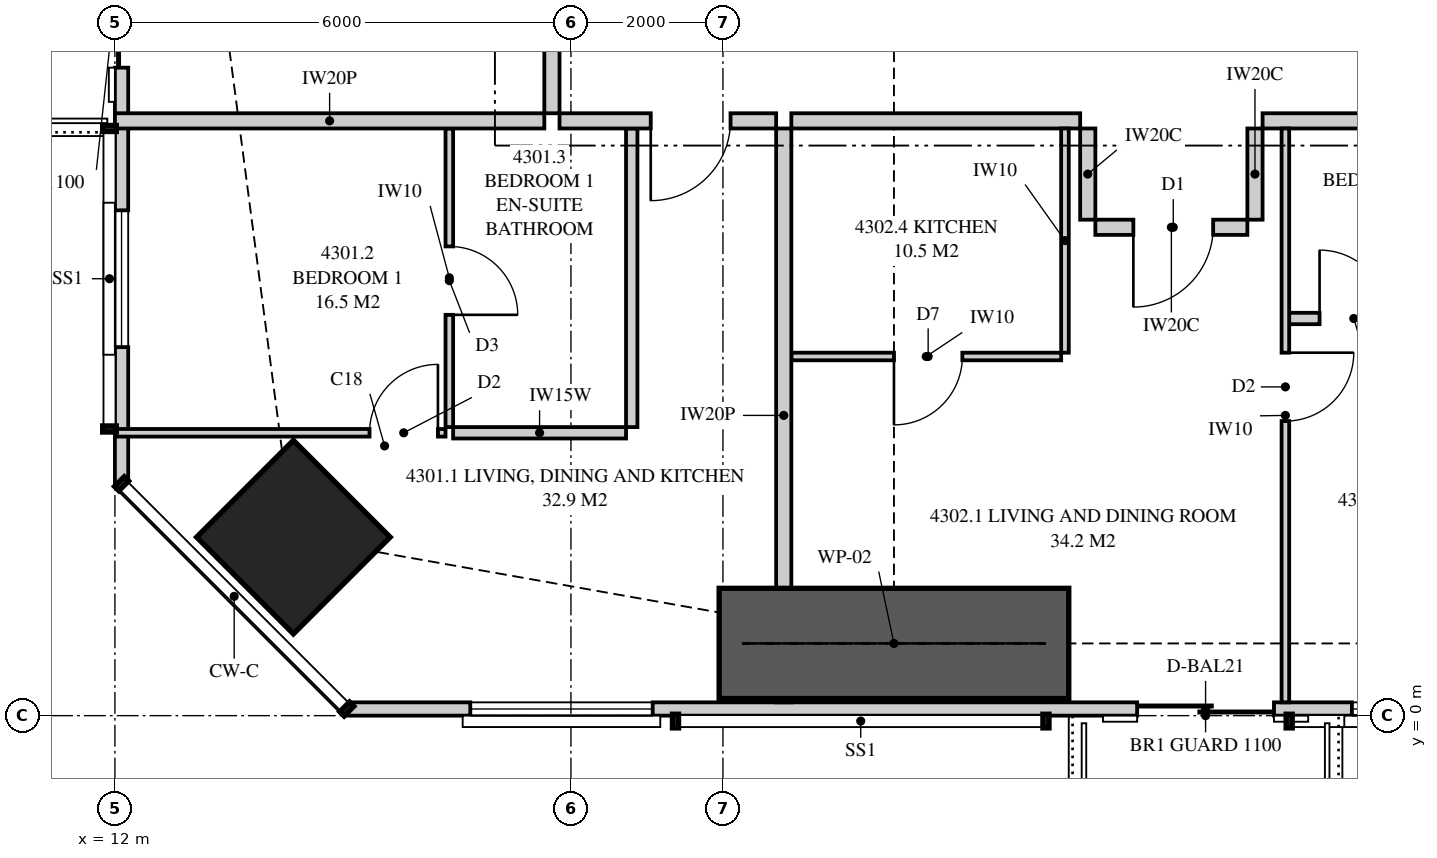
"""IFC4 building model, lengths in metres.
Left out: names, types, materials, properties, quantities, classifications, styles, units other than length and angle.
Written with IfcOpenShell. Run it as: python <this file> out.ifc"""

import sys

from ifc_helpers import new_model, si_unit, direction, frame, frame_2d, origin, origin_2d, place, context, subcontext, project, spatial, polyline, rectangle, outline, extrude, element, fill, save


model = new_model("IFC4")
c1 = context("Model", 3, precision=1e-05, world=origin(), true_north=direction((0.0, 1.0)))
c2 = subcontext(c1, "Body", "Model", "MODEL_VIEW")
j1 = project(units=[si_unit("LENGTHUNIT", "METRE"), si_unit("PLANEANGLEUNIT", "RADIAN")], contexts=[c1])
p1 = place(None, origin())
s1 = spatial("IfcSite", under=j1, at=p1, CompositionType="ELEMENT")
p2 = place(p1, origin())
s2 = spatial("IfcBuilding", under=s1, at=p2, CompositionType="ELEMENT")
p3 = place(p2, frame((0.0, 0.0, 161.05)))
s3 = spatial("IfcBuildingStorey", under=s2, at=p3, CompositionType="ELEMENT", Elevation=161.05)
p4 = place(p3, frame((14.348, 2.348, 0.0), z_axis=(0.0, 0.0, 1.0), x_axis=(0.707106781187, 0.707106781187, 0.0)))
e1 = element("IfcColumn", 1, at=p4, inside=s3, PredefinedType="COLUMN", context=c2, shape_type="SweptSolid", body=[
    extrude(rectangle(XDim=1.8, YDim=1.8, at=origin_2d()), origin(), (0.0, 0.0, 1.0), 3.35),
])
p5 = place(p3, frame((15.051, 0.087, 0.0), z_axis=(0.0, 0.0, 1.0), x_axis=(1.0, 0.0, 0.0)))
e2 = element("IfcWall", 2, at=p5, inside=s3, PredefinedType="SOLIDWALL", context=c2, shape_type="SweptSolid", body=[
    extrude(outline(polyline([(0.0, 0.0), (34.897, 0.0), (34.897, 3.11), (27.91, 3.11), (27.91, 2.15), (27.836, 2.15), (27.836, 3.11), (27.699, 3.11), (27.699, 2.15), (7.199, 2.15), (7.199, 3.11), (7.062, 3.11), (7.062, 2.15), (6.987, 2.15), (6.987, 3.11), (0.0, 3.11), (0.0, 0.0)])), frame((0.0, 0.087, 0.0), z_axis=(0.0, -1.0, 0.0), x_axis=(1.0, 0.0, 0.0)), (0.0, 0.0, 1.0), 0.175),
])
p6 = place(p5, frame((1.625, 0.0, 0.4)))
e3 = element("IfcOpeningElement", 3, at=p6, cuts=e2, PredefinedType="OPENING", context=c2, shape_type="SweptSolid", body=[
    extrude(rectangle(XDim=2.4, YDim=1.7, at=frame_2d((1.2, 0.85))), frame((0.0, 0.097, 0.0), z_axis=(0.0, -1.0, 0.0), x_axis=(1.0, 0.0, 0.0)), (0.0, 0.0, 1.0), 0.195),
])
p7 = place(p5, frame((10.399, 0.0, 0.0)))
e4 = element("IfcOpeningElement", 4, at=p7, cuts=e2, PredefinedType="OPENING", context=c2, shape_type="SweptSolid", body=[
    extrude(rectangle(XDim=1.8, YDim=2.1, at=frame_2d((0.9, 1.05))), frame((0.0, 0.097, 0.0), z_axis=(0.0, -1.0, 0.0), x_axis=(1.0, 0.0, 0.0)), (0.0, 0.0, 1.0), 0.195),
])
p8 = place(p5, frame((13.224, 0.0, 0.4)))
e5 = element("IfcOpeningElement", 5, at=p8, cuts=e2, PredefinedType="OPENING", context=c2, shape_type="SweptSolid", body=[
    extrude(rectangle(XDim=1.8, YDim=1.7, at=frame_2d((0.9, 0.85))), frame((0.0, 0.097, 0.0), z_axis=(0.0, -1.0, 0.0), x_axis=(1.0, 0.0, 0.0)), (0.0, 0.0, 1.0), 0.195),
])
p9 = place(p5, frame((19.849, 0.0, 0.4)))
e6 = element("IfcOpeningElement", 6, at=p9, cuts=e2, PredefinedType="OPENING", context=c2, shape_type="SweptSolid", body=[
    extrude(rectangle(XDim=2.4, YDim=1.7, at=frame_2d((1.2, 0.85))), frame((0.0, 0.097, 0.0), z_axis=(0.0, -1.0, 0.0), x_axis=(1.0, 0.0, 0.0)), (0.0, 0.0, 1.0), 0.195),
])
p10 = place(p5, frame((22.799, 0.0, 0.0)))
e7 = element("IfcOpeningElement", 7, at=p10, cuts=e2, PredefinedType="OPENING", context=c2, shape_type="SweptSolid", body=[
    extrude(rectangle(XDim=1.8, YDim=2.1, at=frame_2d((0.9, 1.05))), frame((0.0, 0.097, 0.0), z_axis=(0.0, -1.0, 0.0), x_axis=(1.0, 0.0, 0.0)), (0.0, 0.0, 1.0), 0.195),
])
p11 = place(p5, frame((30.17, 0.0, 0.4)))
e8 = element("IfcOpeningElement", 8, at=p11, cuts=e2, PredefinedType="OPENING", context=c2, shape_type="SweptSolid", body=[
    extrude(rectangle(XDim=2.4, YDim=1.7, at=frame_2d((1.2, 0.85))), frame((0.0, 0.097, 0.0), z_axis=(0.0, -1.0, 0.0), x_axis=(1.0, 0.0, 0.0)), (0.0, 0.0, 1.0), 0.195),
])
p12 = place(p3, frame((12.087, 32.949, 0.0), z_axis=(0.0, 0.0, 1.0), x_axis=(0.0, -1.0, 0.0)))
e9 = element("IfcWall", 9, at=p12, inside=s3, PredefinedType="SOLIDWALL", context=c2, shape_type="SweptSolid", body=[
    extrude(outline(polyline([(0.0, 0.0), (29.897, 0.0), (29.897, 3.11), (20.191, 3.11), (20.191, 2.15), (20.051, 2.15), (20.051, 3.11), (19.949, 3.11), (19.949, 2.15), (7.949, 2.15), (7.949, 3.11), (7.823, 3.11), (7.823, 2.15), (7.73, 2.15), (7.73, 3.11), (0.0, 3.11), (0.0, 0.0)])), frame((0.0, 0.087, 0.0), z_axis=(0.0, -1.0, 0.0), x_axis=(1.0, 0.0, 0.0)), (0.0, 0.0, 1.0), 0.175),
])
p13 = place(p12, frame((1.297, 0.0, 0.4)))
e10 = element("IfcOpeningElement", 10, at=p13, cuts=e9, PredefinedType="OPENING", context=c2, shape_type="SweptSolid", body=[
    extrude(rectangle(XDim=1.8, YDim=1.7, at=frame_2d((0.9, 0.85))), frame((0.0, 0.097, 0.0), z_axis=(0.0, -1.0, 0.0), x_axis=(1.0, 0.0, 0.0)), (0.0, 0.0, 1.0), 0.195),
])
p14 = place(p12, frame((10.367, 0.0, 0.4)))
e11 = element("IfcOpeningElement", 11, at=p14, cuts=e9, PredefinedType="OPENING", context=c2, shape_type="SweptSolid", body=[
    extrude(rectangle(XDim=1.2, YDim=1.7, at=frame_2d((0.6, 0.85))), frame((0.0, 0.097, 0.0), z_axis=(0.0, -1.0, 0.0), x_axis=(1.0, 0.0, 0.0)), (0.0, 0.0, 1.0), 0.195),
])
p15 = place(p12, frame((15.083, 0.0, 0.4)))
e12 = element("IfcOpeningElement", 12, at=p15, cuts=e9, PredefinedType="OPENING", context=c2, shape_type="SweptSolid", body=[
    extrude(rectangle(XDim=2.4, YDim=1.7, at=frame_2d((1.2, 0.85))), frame((0.0, 0.097, 0.0), z_axis=(0.0, -1.0, 0.0), x_axis=(1.0, 0.0, 0.0)), (0.0, 0.0, 1.0), 0.195),
])
p16 = place(p12, frame((22.624, 0.0, 0.0)))
e13 = element("IfcOpeningElement", 13, at=p16, cuts=e9, PredefinedType="OPENING", context=c2, shape_type="SweptSolid", body=[
    extrude(rectangle(XDim=1.8, YDim=2.1, at=frame_2d((0.9, 1.05))), frame((0.0, 0.097, 0.0), z_axis=(0.0, -1.0, 0.0), x_axis=(1.0, 0.0, 0.0)), (0.0, 0.0, 1.0), 0.195),
])
p17 = place(p12, frame((26.301, 0.0, 0.4)))
e14 = element("IfcOpeningElement", 14, at=p17, cuts=e9, PredefinedType="OPENING", context=c2, shape_type="SweptSolid", body=[
    extrude(rectangle(XDim=1.8, YDim=1.7, at=frame_2d((0.9, 0.85))), frame((0.0, 0.097, 0.0), z_axis=(0.0, -1.0, 0.0), x_axis=(1.0, 0.0, 0.0)), (0.0, 0.0, 1.0), 0.195),
])
p18 = place(p3, frame((20.8, 0.175, 0.0), z_axis=(0.0, 0.0, 1.0), x_axis=(0.0, 1.0, 0.0)))
e15 = element("IfcWall", 15, at=p18, inside=s3, PredefinedType="PARTITIONING", context=c2, shape_type="SweptSolid", body=[
    extrude(outline(polyline([(0.107, 3.11), (0.0, 3.11), (0.0, 0.0), (0.529, 0.0), (0.529, 0.332), (1.021, 0.332), (1.021, 0.0), (7.55, 0.0), (7.55, 3.11), (1.956, 3.11), (1.956, 2.15), (1.021, 2.15), (1.021, 1.818), (0.529, 1.818), (0.529, 2.15), (0.107, 2.15), (0.107, 3.11)])), frame((0.0, 0.1, 0.0), z_axis=(0.0, -1.0, 0.0), x_axis=(1.0, 0.0, 0.0)), (0.0, 0.0, 1.0), 0.2),
])
p19 = place(p3, frame((17.85, 7.825, 0.0), z_axis=(0.0, 0.0, 1.0), x_axis=(1.0, 0.0, 0.0)))
e16 = element("IfcWall", 16, at=p19, inside=s3, PredefinedType="PARTITIONING", context=c2, shape_type="SweptSolid", body=[
    extrude(rectangle(XDim=2.85, YDim=0.2, at=frame_2d((1.425, 0.0))), origin(), (0.0, 0.0, 1.0), 3.11),
])
p20 = place(p19, frame((1.2, 0.0, 0.0)))
e17 = element("IfcOpeningElement", 17, at=p20, cuts=e16, PredefinedType="OPENING", context=c2, shape_type="SweptSolid", body=[
    extrude(rectangle(XDim=1.05, YDim=2.2, at=frame_2d((0.525, 1.1))), frame((0.0, 0.11, 0.0), z_axis=(0.0, -1.0, 0.0), x_axis=(1.0, 0.0, 0.0)), (0.0, 0.0, 1.0), 0.22),
])
p21 = place(p3, frame((16.4, 3.796, 0.0), z_axis=(0.0, 0.0, 1.0), x_axis=(0.0, 1.0, 0.0)))
e18 = element("IfcWall", 18, at=p21, inside=s3, PredefinedType="PARTITIONING", context=c2, shape_type="SweptSolid", body=[
    extrude(rectangle(XDim=3.929, YDim=0.1, at=frame_2d((1.964, 0.0))), origin(), (0.0, 0.0, 1.0), 3.11),
])
p22 = place(p21, frame((1.477, 0.0, 0.0)))
e19 = element("IfcOpeningElement", 19, at=p22, cuts=e18, PredefinedType="OPENING", context=c2, shape_type="SweptSolid", body=[
    extrude(rectangle(XDim=0.9, YDim=2.1, at=frame_2d((0.45, 1.05))), frame((0.0, 0.06, 0.0), z_axis=(0.0, -1.0, 0.0), x_axis=(1.0, 0.0, 0.0)), (0.0, 0.0, 1.0), 0.12),
])
p23 = place(p3, frame((16.35, 3.721, 0.0), z_axis=(0.0, 0.0, 1.0), x_axis=(-1.0, 0.0, 0.0)))
e20 = element("IfcWall", 20, at=p23, inside=s3, PredefinedType="PARTITIONING", context=c2, shape_type="SweptSolid", body=[
    extrude(outline(polyline([(0.0, 0.0), (4.35, 0.0), (4.35, 3.11), (3.049, 3.11), (3.049, 2.15), (1.314, 2.15), (1.314, 3.11), (0.0, 3.11), (0.0, 0.0)])), frame((0.0, 0.05, 0.0), z_axis=(0.0, -1.0, 0.0), x_axis=(1.0, 0.0, 0.0)), (0.0, 0.0, 1.0), 0.1),
])
p24 = place(p23, frame((0.1, 0.0, 0.0)))
e21 = element("IfcOpeningElement", 21, at=p24, cuts=e20, PredefinedType="OPENING", context=c2, shape_type="SweptSolid", body=[
    extrude(rectangle(XDim=0.9, YDim=2.1, at=frame_2d((0.45, 1.05))), frame((0.0, 0.06, 0.0), z_axis=(0.0, -1.0, 0.0), x_axis=(1.0, 0.0, 0.0)), (0.0, 0.0, 1.0), 0.12),
])
p25 = place(p3, frame((18.725, 3.721, 0.0), z_axis=(0.0, 0.0, 1.0), x_axis=(-1.0, 0.0, 0.0)))
e22 = element("IfcWall", 22, at=p25, inside=s3, PredefinedType="PLUMBINGWALL", context=c2, shape_type="SweptSolid", body=[
    extrude(rectangle(XDim=2.275, YDim=0.15, at=frame_2d((1.138, 0.0))), origin(), (0.0, 0.0, 1.0), 3.11),
])
p26 = place(p3, frame((18.8, 3.796, 0.0), z_axis=(0.0, 0.0, 1.0), x_axis=(0.0, 1.0, 0.0)))
e23 = element("IfcWall", 23, at=p26, inside=s3, PredefinedType="PLUMBINGWALL", context=c2, shape_type="SweptSolid", body=[
    extrude(rectangle(XDim=3.929, YDim=0.15, at=frame_2d((1.964, 0.0))), origin(), (0.0, 0.0, 1.0), 3.11),
])
p27 = place(p3, frame((20.9, 7.825, 0.0), z_axis=(0.0, 0.0, 1.0), x_axis=(1.0, 0.0, 0.0)))
e24 = element("IfcWall", 24, at=p27, inside=s3, PredefinedType="PARTITIONING", context=c2, shape_type="SweptSolid", body=[
    extrude(outline(polyline([(0.0, 0.0), (3.8, 0.0), (3.8, 3.11), (1.687, 3.11), (1.687, 2.541), (1.013, 2.541), (1.013, 3.11), (0.0, 3.11), (0.0, 0.0)])), frame((0.0, 0.1, 0.0), z_axis=(0.0, -1.0, 0.0), x_axis=(1.0, 0.0, 0.0)), (0.0, 0.0, 1.0), 0.2),
])
p28 = place(p3, frame((27.4, 0.175, 0.0), z_axis=(0.0, 0.0, 1.0), x_axis=(0.0, 1.0, 0.0)))
e25 = element("IfcWall", 25, at=p28, inside=s3, PredefinedType="PARTITIONING", context=c2, shape_type="SweptSolid", body=[
    extrude(outline(polyline([(0.0, 0.0), (7.55, 0.0), (7.55, 3.11), (1.635, 3.11), (1.635, 2.15), (0.0, 2.15), (0.0, 3.11), (0.0, 0.0)])), frame((0.0, 0.05, 0.0), z_axis=(0.0, -1.0, 0.0), x_axis=(1.0, 0.0, 0.0)), (0.0, 0.0, 1.0), 0.1),
])
p29 = place(p28, frame((3.7, 0.0, 0.0)))
e26 = element("IfcOpeningElement", 26, at=p29, cuts=e25, PredefinedType="OPENING", context=c2, shape_type="SweptSolid", body=[
    extrude(rectangle(XDim=0.9, YDim=2.1, at=frame_2d((0.45, 1.05))), frame((0.0, 0.06, 0.0), z_axis=(0.0, -1.0, 0.0), x_axis=(1.0, 0.0, 0.0)), (0.0, 0.0, 1.0), 0.12),
])
p30 = place(p3, frame((27.45, 5.225, 0.0), z_axis=(0.0, 0.0, 1.0), x_axis=(1.0, 0.0, 0.0)))
e27 = element("IfcWall", 27, at=p30, inside=s3, PredefinedType="PLUMBINGWALL", context=c2, shape_type="SweptSolid", body=[
    extrude(rectangle(XDim=3.45, YDim=0.15, at=frame_2d((1.725, 0.0))), origin(), (0.0, 0.0, 1.0), 3.11),
])
p31 = place(p30, frame((0.4, 0.0, 0.0)))
e28 = element("IfcOpeningElement", 28, at=p31, cuts=e27, PredefinedType="OPENING", context=c2, shape_type="SweptSolid", body=[
    extrude(rectangle(XDim=0.9, YDim=2.1, at=frame_2d((0.45, 1.05))), frame((0.0, 0.085, 0.0), z_axis=(0.0, -1.0, 0.0), x_axis=(1.0, 0.0, 0.0)), (0.0, 0.0, 1.0), 0.17),
])
p32 = place(p3, frame((20.9, 4.725, 0.0), z_axis=(0.0, 0.0, 1.0), x_axis=(1.0, 0.0, 0.0)))
e29 = element("IfcWall", 29, at=p32, inside=s3, PredefinedType="PARTITIONING", context=c2, shape_type="SweptSolid", body=[
    extrude(outline(polyline([(0.0, 0.0), (3.55, 0.0), (3.55, 3.11), (1.637, 3.11), (1.637, 2.541), (1.063, 2.541), (1.063, 3.11), (0.0, 3.11), (0.0, 0.0)])), frame((0.0, 0.05, 0.0), z_axis=(0.0, -1.0, 0.0), x_axis=(1.0, 0.0, 0.0)), (0.0, 0.0, 1.0), 0.1),
])
p33 = place(p32, frame((1.35, 0.0, 0.0)))
e30 = element("IfcOpeningElement", 30, at=p33, cuts=e29, PredefinedType="OPENING", context=c2, shape_type="SweptSolid", body=[
    extrude(rectangle(XDim=0.9, YDim=2.1, at=frame_2d((0.45, 1.05))), frame((0.0, 0.06, 0.0), z_axis=(0.0, -1.0, 0.0), x_axis=(1.0, 0.0, 0.0)), (0.0, 0.0, 1.0), 0.12),
])
p34 = place(p3, frame((24.5, 4.775, 0.0), z_axis=(0.0, 0.0, 1.0), x_axis=(0.0, 1.0, 0.0)))
e31 = element("IfcWall", 31, at=p34, inside=s3, PredefinedType="PARTITIONING", context=c2, shape_type="SweptSolid", body=[
    extrude(rectangle(XDim=2.95, YDim=0.1, at=frame_2d((1.475, 0.0))), origin(), (0.0, 0.0, 1.0), 3.11),
])
p35 = place(p3, frame((12.0, 7.825, 0.0), z_axis=(0.0, 0.0, 1.0), x_axis=(1.0, 0.0, 0.0)))
e32 = element("IfcWall", 32, at=p35, inside=s3, PredefinedType="PARTITIONING", context=c2, shape_type="SweptSolid", body=[
    extrude(outline(polyline([(0.0, 0.0), (5.65, 0.0), (5.65, 3.11), (2.547, 3.11), (2.547, 2.15), (0.712, 2.15), (0.712, 3.11), (0.0, 3.11), (0.0, 0.0)])), frame((0.0, 0.1, 0.0), z_axis=(0.0, -1.0, 0.0), x_axis=(1.0, 0.0, 0.0)), (0.0, 0.0, 1.0), 0.2),
])
p36 = place(p3, frame((17.75, 7.925, 0.0), z_axis=(0.0, 0.0, 1.0), x_axis=(0.0, 1.0, 0.0)))
e33 = element("IfcWall", 33, at=p36, inside=s3, PredefinedType="PARTITIONING", context=c2, shape_type="SweptSolid", body=[
    extrude(outline(polyline([(0.0, 0.0), (12.275, 0.0), (12.275, 3.11), (5.412, 3.11), (5.412, 2.541), (4.738, 2.541), (4.738, 3.11), (0.0, 3.11), (0.0, 0.0)])), frame((0.0, 0.1, 0.0), z_axis=(0.0, -1.0, 0.0), x_axis=(1.0, 0.0, 0.0)), (0.0, 0.0, 1.0), 0.2),
])
p37 = place(p36, frame((10.075, 0.0, 0.0)))
e34 = element("IfcOpeningElement", 34, at=p37, cuts=e33, PredefinedType="OPENING", context=c2, shape_type="SweptSolid", body=[
    extrude(rectangle(XDim=1.05, YDim=2.2, at=frame_2d((0.525, 1.1))), frame((0.0, 0.11, 0.0), z_axis=(0.0, -1.0, 0.0), x_axis=(1.0, 0.0, 0.0)), (0.0, 0.0, 1.0), 0.22),
])
p38 = place(p3, frame((27.1, 7.825, 0.0), z_axis=(0.0, 0.0, 1.0), x_axis=(1.0, 0.0, 0.0)))
e35 = element("IfcWall", 35, at=p38, inside=s3, PredefinedType="PARTITIONING", context=c2, shape_type="SweptSolid", body=[
    extrude(rectangle(XDim=3.8, YDim=0.2, at=frame_2d((1.9, 0.0))), origin(), (0.0, 0.0, 1.0), 3.11),
])
p39 = place(p3, frame((24.9, 6.425, 0.0), z_axis=(0.0, 0.0, 1.0), x_axis=(1.0, 0.0, 0.0)))
e36 = element("IfcWall", 36, at=p39, inside=s3, PredefinedType="PARTITIONING", context=c2, shape_type="SweptSolid", body=[
    extrude(rectangle(XDim=2.0, YDim=0.2, at=frame_2d((1.0, 0.0))), origin(), (0.0, 0.0, 1.0), 3.11),
])
p40 = place(p39, frame((0.5, 0.0, 0.0)))
e37 = element("IfcOpeningElement", 37, at=p40, cuts=e36, PredefinedType="OPENING", context=c2, shape_type="SweptSolid", body=[
    extrude(rectangle(XDim=1.05, YDim=2.2, at=frame_2d((0.525, 1.1))), frame((0.0, 0.11, 0.0), z_axis=(0.0, -1.0, 0.0), x_axis=(1.0, 0.0, 0.0)), (0.0, 0.0, 1.0), 0.22),
])
for number, where, z_axis, x_axis in (
    (38, (24.8, 7.725, 0.0), (0.0, 0.0, 1.0), (0.0, -1.0, 0.0)),
    (39, (27.0, 7.725, 0.0), (0.0, 0.0, 1.0), (0.0, -1.0, 0.0)),
):
    element("IfcWall", number, at=place(p3, frame(where, z_axis=z_axis, x_axis=x_axis)), inside=s3, PredefinedType="PARTITIONING", context=c2, shape_type="SweptSolid", body=[
        extrude(rectangle(XDim=1.2, YDim=0.2, at=frame_2d((0.6, 0.0))), origin(), (0.0, 0.0, 1.0), 3.11),
    ])
p41 = place(p3, frame((19.95, 0.95, 0.0), z_axis=(0.0, 0.0, 1.0), x_axis=(1.0, 0.0, 0.0)))
e40 = element("IfcWall", 40, at=p41, inside=s3, PredefinedType="SHEAR", context=c2, shape_type="SweptSolid", body=[
    extrude(rectangle(XDim=4.6, YDim=1.45, at=frame_2d((2.3, 0.0))), origin(), (0.0, 0.0, 1.0), 3.35),
])
p42 = place(p6, origin())
e41 = element("IfcWindow", 41, at=p42, inside=s3, PartitioningType="SINGLE_PANEL", PredefinedType="WINDOW", context=c2, shape_type="SweptSolid", body=[
    extrude(rectangle(XDim=2.4, YDim=1.7, at=frame_2d((1.2, 0.85))), frame((0.0, 0.03, 0.0), z_axis=(0.0, -1.0, 0.0), x_axis=(1.0, 0.0, 0.0)), (0.0, 0.0, 1.0), 0.06),
])
fill(e3, e41)
p43 = place(p7, origin())
e42 = element("IfcDoor", 42, at=p43, inside=s3, OperationType="SLIDING_TO_LEFT", PredefinedType="DOOR", context=c2, shape_type="SweptSolid", body=[
    extrude(rectangle(XDim=1.8, YDim=2.1, at=frame_2d((0.9, 1.05))), frame((0.0, 0.025, 0.0), z_axis=(0.0, -1.0, 0.0), x_axis=(1.0, 0.0, 0.0)), (0.0, 0.0, 1.0), 0.05),
])
fill(e4, e42)
p44 = place(p8, origin())
e43 = element("IfcWindow", 43, at=p44, inside=s3, PartitioningType="SINGLE_PANEL", PredefinedType="WINDOW", context=c2, shape_type="SweptSolid", body=[
    extrude(rectangle(XDim=1.8, YDim=1.7, at=frame_2d((0.9, 0.85))), frame((0.0, 0.03, 0.0), z_axis=(0.0, -1.0, 0.0), x_axis=(1.0, 0.0, 0.0)), (0.0, 0.0, 1.0), 0.06),
])
fill(e5, e43)
p45 = place(p16, origin())
e44 = element("IfcDoor", 44, at=p45, inside=s3, OperationType="SLIDING_TO_LEFT", PredefinedType="DOOR", context=c2, shape_type="SweptSolid", body=[
    extrude(rectangle(XDim=1.8, YDim=2.1, at=frame_2d((0.9, 1.05))), frame((0.0, 0.025, 0.0), z_axis=(0.0, -1.0, 0.0), x_axis=(1.0, 0.0, 0.0)), (0.0, 0.0, 1.0), 0.05),
])
fill(e13, e44)
p46 = place(p17, origin())
e45 = element("IfcWindow", 45, at=p46, inside=s3, PartitioningType="SINGLE_PANEL", PredefinedType="WINDOW", context=c2, shape_type="SweptSolid", body=[
    extrude(rectangle(XDim=1.8, YDim=1.7, at=frame_2d((0.9, 0.85))), frame((0.0, 0.03, 0.0), z_axis=(0.0, -1.0, 0.0), x_axis=(1.0, 0.0, 0.0)), (0.0, 0.0, 1.0), 0.06),
])
fill(e14, e45)
p47 = place(p20, frame((1.05, 0.0, 0.0), z_axis=(0.0, 0.0, 1.0), x_axis=(-1.0, 0.0, 0.0)))
e46 = element("IfcDoor", 46, at=p47, inside=s3, OperationType="SINGLE_SWING_RIGHT", PredefinedType="DOOR", context=c2, shape_type="SweptSolid", body=[
    extrude(rectangle(XDim=1.05, YDim=2.2, at=frame_2d((0.525, 1.1))), frame((0.0, 0.025, 0.0), z_axis=(0.0, -1.0, 0.0), x_axis=(1.0, 0.0, 0.0)), (0.0, 0.0, 1.0), 0.05),
])
fill(e17, e46)
p48 = place(p24, frame((0.9, 0.0, 0.0), z_axis=(0.0, 0.0, 1.0), x_axis=(-1.0, 0.0, 0.0)))
e47 = element("IfcDoor", 47, at=p48, inside=s3, OperationType="SINGLE_SWING_RIGHT", PredefinedType="DOOR", context=c2, shape_type="SweptSolid", body=[
    extrude(rectangle(XDim=0.9, YDim=2.1, at=frame_2d((0.45, 1.05))), frame((0.0, 0.025, 0.0), z_axis=(0.0, -1.0, 0.0), x_axis=(1.0, 0.0, 0.0)), (0.0, 0.0, 1.0), 0.05),
])
fill(e21, e47)
p49 = place(p22, frame((0.9, 0.0, 0.0), z_axis=(0.0, 0.0, 1.0), x_axis=(-1.0, 0.0, 0.0)))
e48 = element("IfcDoor", 48, at=p49, inside=s3, OperationType="SINGLE_SWING_RIGHT", PredefinedType="DOOR", context=c2, shape_type="SweptSolid", body=[
    extrude(rectangle(XDim=0.9, YDim=2.1, at=frame_2d((0.45, 1.05))), frame((0.0, 0.025, 0.0), z_axis=(0.0, -1.0, 0.0), x_axis=(1.0, 0.0, 0.0)), (0.0, 0.0, 1.0), 0.05),
])
fill(e19, e48)
p50 = place(p40, frame((1.05, 0.0, 0.0), z_axis=(0.0, 0.0, 1.0), x_axis=(-1.0, 0.0, 0.0)))
e49 = element("IfcDoor", 49, at=p50, inside=s3, OperationType="SINGLE_SWING_RIGHT", PredefinedType="DOOR", context=c2, shape_type="SweptSolid", body=[
    extrude(rectangle(XDim=1.05, YDim=2.2, at=frame_2d((0.525, 1.1))), frame((0.0, 0.025, 0.0), z_axis=(0.0, -1.0, 0.0), x_axis=(1.0, 0.0, 0.0)), (0.0, 0.0, 1.0), 0.05),
])
fill(e37, e49)
p51 = place(p29, frame((0.9, 0.0, 0.0), z_axis=(0.0, 0.0, 1.0), x_axis=(-1.0, 0.0, 0.0)))
e50 = element("IfcDoor", 50, at=p51, inside=s3, OperationType="SINGLE_SWING_LEFT", PredefinedType="DOOR", context=c2, shape_type="SweptSolid", body=[
    extrude(rectangle(XDim=0.9, YDim=2.1, at=frame_2d((0.45, 1.05))), frame((0.0, 0.025, 0.0), z_axis=(0.0, -1.0, 0.0), x_axis=(1.0, 0.0, 0.0)), (0.0, 0.0, 1.0), 0.05),
])
fill(e26, e50)
p52 = place(p31, origin())
e51 = element("IfcDoor", 51, at=p52, inside=s3, OperationType="SINGLE_SWING_LEFT", PredefinedType="DOOR", context=c2, shape_type="SweptSolid", body=[
    extrude(rectangle(XDim=0.9, YDim=2.1, at=frame_2d((0.45, 1.05))), frame((0.0, 0.025, 0.0), z_axis=(0.0, -1.0, 0.0), x_axis=(1.0, 0.0, 0.0)), (0.0, 0.0, 1.0), 0.05),
])
fill(e28, e51)
p53 = place(p33, frame((0.9, 0.0, 0.0), z_axis=(0.0, 0.0, 1.0), x_axis=(-1.0, 0.0, 0.0)))
e52 = element("IfcDoor", 52, at=p53, inside=s3, OperationType="SINGLE_SWING_RIGHT", PredefinedType="DOOR", context=c2, shape_type="SweptSolid", body=[
    extrude(rectangle(XDim=0.9, YDim=2.1, at=frame_2d((0.45, 1.05))), frame((0.0, 0.025, 0.0), z_axis=(0.0, -1.0, 0.0), x_axis=(1.0, 0.0, 0.0)), (0.0, 0.0, 1.0), 0.05),
])
fill(e30, e52)
save(model, sys.argv[1])
